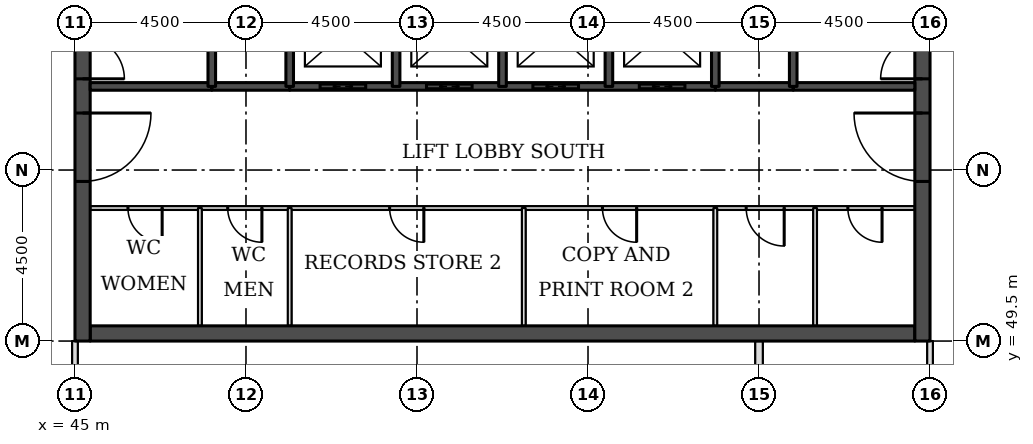
"""IFC4 building model, lengths in metres.
Left out: names, types, materials, properties, quantities, classifications, styles, units other than length and angle.
Written with IfcOpenShell. Run it as: python <this file> out.ifc"""

import sys

from ifc_helpers import new_model, si_unit, direction, frame, frame_2d, origin, place, context, subcontext, project, spatial, rectangle, extrude, element, fill, save


model = new_model("IFC4")
c1 = context("Model", 3, precision=1e-05, world=origin(), true_north=direction((0.0, 1.0)))
c2 = subcontext(c1, "Body", "Model", "MODEL_VIEW")
j1 = project(units=[si_unit("LENGTHUNIT", "METRE"), si_unit("PLANEANGLEUNIT", "RADIAN")], contexts=[c1])
p1 = place(None, origin())
s1 = spatial("IfcSite", under=j1, at=p1, CompositionType="ELEMENT")
p2 = place(p1, origin())
s2 = spatial("IfcBuilding", under=s1, at=p2, CompositionType="ELEMENT")
p3 = place(p2, frame((0.0, 0.0, 177.3)))
s3 = spatial("IfcBuildingStorey", under=s2, at=p3, CompositionType="ELEMENT", Elevation=177.3)
p4 = place(p3, frame((45.4, 49.7, 0.0), z_axis=(0.0, 0.0, 1.0), x_axis=(1.0, 0.0, 0.0)))
e1 = element("IfcWall", 1, at=p4, inside=s3, PredefinedType="SHEAR", context=c2, shape_type="SweptSolid", body=[
    extrude(rectangle(XDim=21.7, YDim=0.4, at=frame_2d((10.85, 0.0))), origin(), (0.0, 0.0, 1.0), 3.7),
])
p5 = place(p3, frame((45.2, 49.5, 0.0), z_axis=(0.0, 0.0, 1.0), x_axis=(0.0, 1.0, 0.0)))
e2 = element("IfcWall", 2, at=p5, inside=s3, PredefinedType="SHEAR", context=c2, shape_type="SweptSolid", body=[
    extrude(rectangle(XDim=22.5, YDim=0.4, at=frame_2d((11.25, 0.0))), origin(), (0.0, 0.0, 1.0), 3.7),
])
p6 = place(p5, frame((4.2, 0.0, 0.0)))
e3 = element("IfcOpeningElement", 3, at=p6, cuts=e2, PredefinedType="OPENING", context=c2, shape_type="SweptSolid", body=[
    extrude(rectangle(XDim=1.8, YDim=2.1, at=frame_2d((0.9, 1.05))), frame((0.0, 0.21, 0.0), z_axis=(0.0, -1.0, 0.0), x_axis=(1.0, 0.0, 0.0)), (0.0, 0.0, 1.0), 0.42),
])
p7 = place(p5, frame((6.9, 0.0, 0.0)))
e4 = element("IfcOpeningElement", 4, at=p7, cuts=e2, PredefinedType="OPENING", context=c2, shape_type="SweptSolid", body=[
    extrude(rectangle(XDim=1.1, YDim=2.1, at=frame_2d((0.55, 1.05))), frame((0.0, 0.21, 0.0), z_axis=(0.0, -1.0, 0.0), x_axis=(1.0, 0.0, 0.0)), (0.0, 0.0, 1.0), 0.42),
])
p8 = place(p5, frame((13.6, 0.0, 0.0)))
e5 = element("IfcOpeningElement", 5, at=p8, cuts=e2, PredefinedType="OPENING", context=c2, shape_type="SweptSolid", body=[
    extrude(rectangle(XDim=1.1, YDim=2.1, at=frame_2d((0.55, 1.05))), frame((0.0, 0.21, 0.0), z_axis=(0.0, -1.0, 0.0), x_axis=(1.0, 0.0, 0.0)), (0.0, 0.0, 1.0), 0.42),
])
p9 = place(p5, frame((16.5, 0.0, 0.0)))
e6 = element("IfcOpeningElement", 6, at=p9, cuts=e2, PredefinedType="OPENING", context=c2, shape_type="SweptSolid", body=[
    extrude(rectangle(XDim=1.8, YDim=2.1, at=frame_2d((0.9, 1.05))), frame((0.0, 0.21, 0.0), z_axis=(0.0, -1.0, 0.0), x_axis=(1.0, 0.0, 0.0)), (0.0, 0.0, 1.0), 0.42),
])
p10 = place(p3, frame((67.3, 49.5, 0.0), z_axis=(0.0, 0.0, 1.0), x_axis=(0.0, 1.0, 0.0)))
e7 = element("IfcWall", 7, at=p10, inside=s3, PredefinedType="SHEAR", context=c2, shape_type="SweptSolid", body=[
    extrude(rectangle(XDim=22.5, YDim=0.4, at=frame_2d((11.25, 0.0))), origin(), (0.0, 0.0, 1.0), 3.7),
])
p11 = place(p10, frame((4.2, 0.0, 0.0)))
e8 = element("IfcOpeningElement", 8, at=p11, cuts=e7, PredefinedType="OPENING", context=c2, shape_type="SweptSolid", body=[
    extrude(rectangle(XDim=1.8, YDim=2.1, at=frame_2d((0.9, 1.05))), frame((0.0, 0.21, 0.0), z_axis=(0.0, -1.0, 0.0), x_axis=(1.0, 0.0, 0.0)), (0.0, 0.0, 1.0), 0.42),
])
p12 = place(p10, frame((6.9, 0.0, 0.0)))
e9 = element("IfcOpeningElement", 9, at=p12, cuts=e7, PredefinedType="OPENING", context=c2, shape_type="SweptSolid", body=[
    extrude(rectangle(XDim=1.1, YDim=2.1, at=frame_2d((0.55, 1.05))), frame((0.0, 0.21, 0.0), z_axis=(0.0, -1.0, 0.0), x_axis=(1.0, 0.0, 0.0)), (0.0, 0.0, 1.0), 0.42),
])
p13 = place(p10, frame((13.6, 0.0, 0.0)))
e10 = element("IfcOpeningElement", 10, at=p13, cuts=e7, PredefinedType="OPENING", context=c2, shape_type="SweptSolid", body=[
    extrude(rectangle(XDim=1.1, YDim=2.1, at=frame_2d((0.55, 1.05))), frame((0.0, 0.21, 0.0), z_axis=(0.0, -1.0, 0.0), x_axis=(1.0, 0.0, 0.0)), (0.0, 0.0, 1.0), 0.42),
])
p14 = place(p10, frame((16.5, 0.0, 0.0)))
e11 = element("IfcOpeningElement", 11, at=p14, cuts=e7, PredefinedType="OPENING", context=c2, shape_type="SweptSolid", body=[
    extrude(rectangle(XDim=1.8, YDim=2.1, at=frame_2d((0.9, 1.05))), frame((0.0, 0.21, 0.0), z_axis=(0.0, -1.0, 0.0), x_axis=(1.0, 0.0, 0.0)), (0.0, 0.0, 1.0), 0.42),
])
p15 = place(p3, frame((67.5, 43.5, 0.0), z_axis=(0.0, 0.0, 1.0), x_axis=(0.0, 1.0, 0.0)))
e12 = element("IfcWall", 12, at=p15, inside=s3, PredefinedType="PARTITIONING", context=c2, shape_type="SweptSolid", body=[
    extrude(rectangle(XDim=6.0, YDim=0.15, at=frame_2d((3.0, 0.0))), origin(), (0.0, 0.0, 1.0), 3.022),
])
p16 = place(p15, frame((2.5, 0.0, 0.0)))
e13 = element("IfcOpeningElement", 13, at=p16, cuts=e12, PredefinedType="OPENING", context=c2, shape_type="SweptSolid", body=[
    extrude(rectangle(XDim=1.0, YDim=2.1, at=frame_2d((0.5, 1.05))), frame((0.0, 0.085, 0.0), z_axis=(0.0, -1.0, 0.0), x_axis=(1.0, 0.0, 0.0)), (0.0, 0.0, 1.0), 0.17),
])
p17 = place(p3, frame((45.0, 46.5, 0.0), z_axis=(0.0, 0.0, 1.0), x_axis=(0.0, 1.0, 0.0)))
e14 = element("IfcWall", 14, at=p17, inside=s3, PredefinedType="PARTITIONING", context=c2, shape_type="SweptSolid", body=[
    extrude(rectangle(XDim=3.0, YDim=0.15, at=frame_2d((1.5, 0.0))), origin(), (0.0, 0.0, 1.0), 3.022),
])
p18 = place(p17, frame((1.0, 0.0, 0.0)))
e15 = element("IfcOpeningElement", 15, at=p18, cuts=e14, PredefinedType="OPENING", context=c2, shape_type="SweptSolid", body=[
    extrude(rectangle(XDim=1.0, YDim=2.1, at=frame_2d((0.5, 1.05))), frame((0.0, 0.085, 0.0), z_axis=(0.0, -1.0, 0.0), x_axis=(1.0, 0.0, 0.0)), (0.0, 0.0, 1.0), 0.17),
])
p19 = place(p3, frame((63.0, 46.5, 0.0), z_axis=(0.0, 0.0, 1.0), x_axis=(0.0, 1.0, 0.0)))
e16 = element("IfcWall", 16, at=p19, inside=s3, PredefinedType="PARTITIONING", context=c2, shape_type="SweptSolid", body=[
    extrude(rectangle(XDim=3.0, YDim=0.2, at=frame_2d((1.5, 0.0))), origin(), (0.0, 0.0, 1.0), 3.55),
])
p20 = place(p3, frame((45.4, 53.0, 0.0), z_axis=(0.0, 0.0, 1.0), x_axis=(1.0, 0.0, 0.0)))
e17 = element("IfcWall", 17, at=p20, inside=s3, PredefinedType="PARTITIONING", context=c2, shape_type="SweptSolid", body=[
    extrude(rectangle(XDim=21.7, YDim=0.1, at=frame_2d((10.85, 0.0))), origin(), (0.0, 0.0, 1.0), 3.55),
])
p21 = place(p20, frame((19.938, 0.0, 0.0)))
e18 = element("IfcOpeningElement", 18, at=p21, cuts=e17, PredefinedType="OPENING", context=c2, shape_type="SweptSolid", body=[
    extrude(rectangle(XDim=0.9, YDim=2.1, at=frame_2d((0.45, 1.05))), frame((0.0, 0.06, 0.0), z_axis=(0.0, -1.0, 0.0), x_axis=(1.0, 0.0, 0.0)), (0.0, 0.0, 1.0), 0.12),
])
p22 = place(p20, frame((17.262, 0.0, 0.0)))
e19 = element("IfcOpeningElement", 19, at=p22, cuts=e17, PredefinedType="OPENING", context=c2, shape_type="SweptSolid", body=[
    extrude(rectangle(XDim=1.0, YDim=2.1, at=frame_2d((0.5, 1.05))), frame((0.0, 0.06, 0.0), z_axis=(0.0, -1.0, 0.0), x_axis=(1.0, 0.0, 0.0)), (0.0, 0.0, 1.0), 0.12),
])
p23 = place(p20, frame((0.994, 0.0, 0.0)))
e20 = element("IfcOpeningElement", 20, at=p23, cuts=e17, PredefinedType="OPENING", context=c2, shape_type="SweptSolid", body=[
    extrude(rectangle(XDim=0.9, YDim=2.1, at=frame_2d((0.45, 1.05))), frame((0.0, 0.06, 0.0), z_axis=(0.0, -1.0, 0.0), x_axis=(1.0, 0.0, 0.0)), (0.0, 0.0, 1.0), 0.12),
])
p24 = place(p20, frame((3.619, 0.0, 0.0)))
e21 = element("IfcOpeningElement", 21, at=p24, cuts=e17, PredefinedType="OPENING", context=c2, shape_type="SweptSolid", body=[
    extrude(rectangle(XDim=0.9, YDim=2.1, at=frame_2d((0.45, 1.05))), frame((0.0, 0.06, 0.0), z_axis=(0.0, -1.0, 0.0), x_axis=(1.0, 0.0, 0.0)), (0.0, 0.0, 1.0), 0.12),
])
p25 = place(p20, frame((7.88, 0.0, 0.0)))
e22 = element("IfcOpeningElement", 22, at=p25, cuts=e17, PredefinedType="OPENING", context=c2, shape_type="SweptSolid", body=[
    extrude(rectangle(XDim=0.9, YDim=2.1, at=frame_2d((0.45, 1.05))), frame((0.0, 0.06, 0.0), z_axis=(0.0, -1.0, 0.0), x_axis=(1.0, 0.0, 0.0)), (0.0, 0.0, 1.0), 0.12),
])
p26 = place(p20, frame((13.48, 0.0, 0.0)))
e23 = element("IfcOpeningElement", 23, at=p26, cuts=e17, PredefinedType="OPENING", context=c2, shape_type="SweptSolid", body=[
    extrude(rectangle(XDim=0.9, YDim=2.1, at=frame_2d((0.45, 1.05))), frame((0.0, 0.06, 0.0), z_axis=(0.0, -1.0, 0.0), x_axis=(1.0, 0.0, 0.0)), (0.0, 0.0, 1.0), 0.12),
])
for number, where, z_axis, x_axis in (
    (24, (48.6, 56.2, 0.0), (0.0, 0.0, 1.0), (1.0, 0.0, 0.0)),
    (25, (61.85, 56.2, 0.0), (0.0, 0.0, 1.0), (1.0, 0.0, 0.0)),
):
    element("IfcWall", number, at=place(p3, frame(where, z_axis=z_axis, x_axis=x_axis)), inside=s3, PredefinedType="SOLIDWALL", context=c2, shape_type="SweptSolid", body=[
        extrude(rectangle(XDim=2.05, YDim=0.2, at=frame_2d((1.025, 0.0))), origin(), (0.0, 0.0, 1.0), 3.55),
    ])
p27 = place(p3, frame((45.4, 56.2, 0.0), z_axis=(0.0, 0.0, 1.0), x_axis=(1.0, 0.0, 0.0)))
e26 = element("IfcWall", 26, at=p27, inside=s3, PredefinedType="SOLIDWALL", context=c2, shape_type="SweptSolid", body=[
    extrude(rectangle(XDim=3.2, YDim=0.2, at=frame_2d((1.6, 0.0))), origin(), (0.0, 0.0, 1.0), 3.55),
])
p28 = place(p3, frame((50.65, 56.2, 0.0), z_axis=(0.0, 0.0, 1.0), x_axis=(1.0, 0.0, 0.0)))
e27 = element("IfcWall", 27, at=p28, inside=s3, PredefinedType="SOLIDWALL", context=c2, shape_type="SweptSolid", body=[
    extrude(rectangle(XDim=11.2, YDim=0.2, at=frame_2d((5.6, 0.0))), origin(), (0.0, 0.0, 1.0), 3.55),
])
p29 = place(p28, frame((0.8, 0.0, 0.0)))
e28 = element("IfcOpeningElement", 28, at=p29, cuts=e27, PredefinedType="OPENING", context=c2, shape_type="SweptSolid", body=[
    extrude(rectangle(XDim=1.2, YDim=2.1, at=frame_2d((0.6, 1.05))), frame((0.0, 0.11, 0.0), z_axis=(0.0, -1.0, 0.0), x_axis=(1.0, 0.0, 0.0)), (0.0, 0.0, 1.0), 0.22),
])
p30 = place(p28, frame((3.6, 0.0, 0.0)))
e29 = element("IfcOpeningElement", 29, at=p30, cuts=e27, PredefinedType="OPENING", context=c2, shape_type="SweptSolid", body=[
    extrude(rectangle(XDim=1.2, YDim=2.1, at=frame_2d((0.6, 1.05))), frame((0.0, 0.11, 0.0), z_axis=(0.0, -1.0, 0.0), x_axis=(1.0, 0.0, 0.0)), (0.0, 0.0, 1.0), 0.22),
])
p31 = place(p28, frame((6.4, 0.0, 0.0)))
e30 = element("IfcOpeningElement", 30, at=p31, cuts=e27, PredefinedType="OPENING", context=c2, shape_type="SweptSolid", body=[
    extrude(rectangle(XDim=1.2, YDim=2.1, at=frame_2d((0.6, 1.05))), frame((0.0, 0.11, 0.0), z_axis=(0.0, -1.0, 0.0), x_axis=(1.0, 0.0, 0.0)), (0.0, 0.0, 1.0), 0.22),
])
p32 = place(p28, frame((9.2, 0.0, 0.0)))
e31 = element("IfcOpeningElement", 31, at=p32, cuts=e27, PredefinedType="OPENING", context=c2, shape_type="SweptSolid", body=[
    extrude(rectangle(XDim=1.2, YDim=2.1, at=frame_2d((0.6, 1.05))), frame((0.0, 0.11, 0.0), z_axis=(0.0, -1.0, 0.0), x_axis=(1.0, 0.0, 0.0)), (0.0, 0.0, 1.0), 0.22),
])
p33 = place(p3, frame((63.9, 56.2, 0.0), z_axis=(0.0, 0.0, 1.0), x_axis=(1.0, 0.0, 0.0)))
e32 = element("IfcWall", 32, at=p33, inside=s3, PredefinedType="SOLIDWALL", context=c2, shape_type="SweptSolid", body=[
    extrude(rectangle(XDim=3.2, YDim=0.2, at=frame_2d((1.6, 0.0))), origin(), (0.0, 0.0, 1.0), 3.55),
])
p34 = place(p3, frame((48.288, 49.9, 0.0), z_axis=(0.0, 0.0, 1.0), x_axis=(0.0, 1.0, 0.0)))
e33 = element("IfcWall", 33, at=p34, inside=s3, PredefinedType="PARTITIONING", context=c2, shape_type="SweptSolid", body=[
    extrude(rectangle(XDim=3.1, YDim=0.1, at=frame_2d((1.55, 0.0))), origin(), (0.0, 0.0, 1.0), 3.55),
])
p35 = place(p3, frame((48.6, 56.2, 0.0), z_axis=(0.0, 0.0, 1.0), x_axis=(0.0, 1.0, 0.0)))
e34 = element("IfcWall", 34, at=p35, inside=s3, PredefinedType="SOLIDWALL", context=c2, shape_type="SweptSolid", body=[
    extrude(rectangle(XDim=5.8, YDim=0.2, at=frame_2d((2.9, 0.0))), origin(), (0.0, 0.0, 1.0), 3.55),
])
p36 = place(p3, frame((50.65, 49.9, 0.0), z_axis=(0.0, 0.0, 1.0), x_axis=(0.0, 1.0, 0.0)))
e35 = element("IfcWall", 35, at=p36, inside=s3, PredefinedType="PARTITIONING", context=c2, shape_type="SweptSolid", body=[
    extrude(rectangle(XDim=3.1, YDim=0.1, at=frame_2d((1.55, 0.0))), origin(), (0.0, 0.0, 1.0), 3.55),
])
for number, where, z_axis, x_axis in (
    (36, (50.65, 56.2, 0.0), (0.0, 0.0, 1.0), (0.0, 1.0, 0.0)),
    (37, (53.45, 56.2, 0.0), (0.0, 0.0, 1.0), (0.0, 1.0, 0.0)),
    (38, (56.25, 56.2, 0.0), (0.0, 0.0, 1.0), (0.0, 1.0, 0.0)),
):
    element("IfcWall", number, at=place(p3, frame(where, z_axis=z_axis, x_axis=x_axis)), inside=s3, PredefinedType="SOLIDWALL", context=c2, shape_type="SweptSolid", body=[
        extrude(rectangle(XDim=2.8, YDim=0.2, at=frame_2d((1.4, 0.0))), origin(), (0.0, 0.0, 1.0), 3.55),
    ])
p37 = place(p3, frame((56.81, 49.9, 0.0), z_axis=(0.0, 0.0, 1.0), x_axis=(0.0, 1.0, 0.0)))
e39 = element("IfcWall", 39, at=p37, inside=s3, PredefinedType="PARTITIONING", context=c2, shape_type="SweptSolid", body=[
    extrude(rectangle(XDim=3.1, YDim=0.1, at=frame_2d((1.55, 0.0))), origin(), (0.0, 0.0, 1.0), 3.55),
])
p38 = place(p3, frame((59.05, 56.2, 0.0), z_axis=(0.0, 0.0, 1.0), x_axis=(0.0, 1.0, 0.0)))
e40 = element("IfcWall", 40, at=p38, inside=s3, PredefinedType="SOLIDWALL", context=c2, shape_type="SweptSolid", body=[
    extrude(rectangle(XDim=2.8, YDim=0.2, at=frame_2d((1.4, 0.0))), origin(), (0.0, 0.0, 1.0), 3.55),
])
p39 = place(p3, frame((61.85, 49.9, 0.0), z_axis=(0.0, 0.0, 1.0), x_axis=(0.0, 1.0, 0.0)))
e41 = element("IfcWall", 41, at=p39, inside=s3, PredefinedType="PARTITIONING", context=c2, shape_type="SweptSolid", body=[
    extrude(rectangle(XDim=3.1, YDim=0.1, at=frame_2d((1.55, 0.0))), origin(), (0.0, 0.0, 1.0), 3.55),
])
p40 = place(p3, frame((61.85, 56.2, 0.0), z_axis=(0.0, 0.0, 1.0), x_axis=(0.0, 1.0, 0.0)))
e42 = element("IfcWall", 42, at=p40, inside=s3, PredefinedType="SOLIDWALL", context=c2, shape_type="SweptSolid", body=[
    extrude(rectangle(XDim=2.8, YDim=0.2, at=frame_2d((1.4, 0.0))), origin(), (0.0, 0.0, 1.0), 3.55),
])
p41 = place(p3, frame((63.9, 56.2, 0.0), z_axis=(0.0, 0.0, 1.0), x_axis=(0.0, 1.0, 0.0)))
e43 = element("IfcWall", 43, at=p41, inside=s3, PredefinedType="SOLIDWALL", context=c2, shape_type="SweptSolid", body=[
    extrude(rectangle(XDim=5.8, YDim=0.2, at=frame_2d((2.9, 0.0))), origin(), (0.0, 0.0, 1.0), 3.55),
])
p42 = place(p3, frame((64.475, 49.9, 0.0), z_axis=(0.0, 0.0, 1.0), x_axis=(0.0, 1.0, 0.0)))
e44 = element("IfcWall", 44, at=p42, inside=s3, PredefinedType="PARTITIONING", context=c2, shape_type="SweptSolid", body=[
    extrude(rectangle(XDim=3.1, YDim=0.1, at=frame_2d((1.55, 0.0))), origin(), (0.0, 0.0, 1.0), 3.55),
])
p43 = place(p29, origin())
e45 = element("IfcDoor", 45, at=p43, inside=s3, OperationType="DOUBLE_DOOR_SLIDING", PredefinedType="DOOR", context=c2, shape_type="SweptSolid", body=[
    extrude(rectangle(XDim=1.2, YDim=2.1, at=frame_2d((0.6, 1.05))), frame((0.0, 0.025, 0.0), z_axis=(0.0, -1.0, 0.0), x_axis=(1.0, 0.0, 0.0)), (0.0, 0.0, 1.0), 0.05),
])
fill(e28, e45)
p44 = place(p30, origin())
e46 = element("IfcDoor", 46, at=p44, inside=s3, OperationType="DOUBLE_DOOR_SLIDING", PredefinedType="DOOR", context=c2, shape_type="SweptSolid", body=[
    extrude(rectangle(XDim=1.2, YDim=2.1, at=frame_2d((0.6, 1.05))), frame((0.0, 0.025, 0.0), z_axis=(0.0, -1.0, 0.0), x_axis=(1.0, 0.0, 0.0)), (0.0, 0.0, 1.0), 0.05),
])
fill(e29, e46)
p45 = place(p31, origin())
e47 = element("IfcDoor", 47, at=p45, inside=s3, OperationType="DOUBLE_DOOR_SLIDING", PredefinedType="DOOR", context=c2, shape_type="SweptSolid", body=[
    extrude(rectangle(XDim=1.2, YDim=2.1, at=frame_2d((0.6, 1.05))), frame((0.0, 0.025, 0.0), z_axis=(0.0, -1.0, 0.0), x_axis=(1.0, 0.0, 0.0)), (0.0, 0.0, 1.0), 0.05),
])
fill(e30, e47)
p46 = place(p32, origin())
e48 = element("IfcDoor", 48, at=p46, inside=s3, OperationType="DOUBLE_DOOR_SLIDING", PredefinedType="DOOR", context=c2, shape_type="SweptSolid", body=[
    extrude(rectangle(XDim=1.2, YDim=2.1, at=frame_2d((0.6, 1.05))), frame((0.0, 0.025, 0.0), z_axis=(0.0, -1.0, 0.0), x_axis=(1.0, 0.0, 0.0)), (0.0, 0.0, 1.0), 0.05),
])
fill(e31, e48)
p47 = place(p6, frame((1.8, 0.0, 0.0), z_axis=(0.0, 0.0, 1.0), x_axis=(-1.0, 0.0, 0.0)))
e49 = element("IfcDoor", 49, at=p47, inside=s3, OperationType="SINGLE_SWING_LEFT", PredefinedType="DOOR", context=c2, shape_type="SweptSolid", body=[
    extrude(rectangle(XDim=1.8, YDim=2.1, at=frame_2d((0.9, 1.05))), frame((0.0, 0.025, 0.0), z_axis=(0.0, -1.0, 0.0), x_axis=(1.0, 0.0, 0.0)), (0.0, 0.0, 1.0), 0.05),
])
fill(e3, e49)
p48 = place(p7, frame((1.1, 0.0, 0.0), z_axis=(0.0, 0.0, 1.0), x_axis=(-1.0, 0.0, 0.0)))
e50 = element("IfcDoor", 50, at=p48, inside=s3, OperationType="SINGLE_SWING_RIGHT", PredefinedType="DOOR", context=c2, shape_type="SweptSolid", body=[
    extrude(rectangle(XDim=1.1, YDim=2.1, at=frame_2d((0.55, 1.05))), frame((0.0, 0.025, 0.0), z_axis=(0.0, -1.0, 0.0), x_axis=(1.0, 0.0, 0.0)), (0.0, 0.0, 1.0), 0.05),
])
fill(e4, e50)
p49 = place(p11, origin())
e51 = element("IfcDoor", 51, at=p49, inside=s3, OperationType="SINGLE_SWING_RIGHT", PredefinedType="DOOR", context=c2, shape_type="SweptSolid", body=[
    extrude(rectangle(XDim=1.8, YDim=2.1, at=frame_2d((0.9, 1.05))), frame((0.0, 0.025, 0.0), z_axis=(0.0, -1.0, 0.0), x_axis=(1.0, 0.0, 0.0)), (0.0, 0.0, 1.0), 0.05),
])
fill(e8, e51)
p50 = place(p12, origin())
e52 = element("IfcDoor", 52, at=p50, inside=s3, OperationType="SINGLE_SWING_LEFT", PredefinedType="DOOR", context=c2, shape_type="SweptSolid", body=[
    extrude(rectangle(XDim=1.1, YDim=2.1, at=frame_2d((0.55, 1.05))), frame((0.0, 0.025, 0.0), z_axis=(0.0, -1.0, 0.0), x_axis=(1.0, 0.0, 0.0)), (0.0, 0.0, 1.0), 0.05),
])
fill(e9, e52)
p51 = place(p21, frame((0.9, 0.0, 0.0), z_axis=(0.0, 0.0, 1.0), x_axis=(-1.0, 0.0, 0.0)))
e53 = element("IfcDoor", 53, at=p51, inside=s3, OperationType="SINGLE_SWING_LEFT", PredefinedType="DOOR", context=c2, shape_type="SweptSolid", body=[
    extrude(rectangle(XDim=0.9, YDim=2.1, at=frame_2d((0.45, 1.05))), frame((0.0, 0.025, 0.0), z_axis=(0.0, -1.0, 0.0), x_axis=(1.0, 0.0, 0.0)), (0.0, 0.0, 1.0), 0.05),
])
fill(e18, e53)
p52 = place(p22, frame((1.0, 0.0, 0.0), z_axis=(0.0, 0.0, 1.0), x_axis=(-1.0, 0.0, 0.0)))
e54 = element("IfcDoor", 54, at=p52, inside=s3, OperationType="SINGLE_SWING_LEFT", PredefinedType="DOOR", context=c2, shape_type="SweptSolid", body=[
    extrude(rectangle(XDim=1.0, YDim=2.1, at=frame_2d((0.5, 1.05))), frame((0.0, 0.025, 0.0), z_axis=(0.0, -1.0, 0.0), x_axis=(1.0, 0.0, 0.0)), (0.0, 0.0, 1.0), 0.05),
])
fill(e19, e54)
p53 = place(p23, frame((0.9, 0.0, 0.0), z_axis=(0.0, 0.0, 1.0), x_axis=(-1.0, 0.0, 0.0)))
e55 = element("IfcDoor", 55, at=p53, inside=s3, OperationType="SINGLE_SWING_LEFT", PredefinedType="DOOR", context=c2, shape_type="SweptSolid", body=[
    extrude(rectangle(XDim=0.9, YDim=2.1, at=frame_2d((0.45, 1.05))), frame((0.0, 0.025, 0.0), z_axis=(0.0, -1.0, 0.0), x_axis=(1.0, 0.0, 0.0)), (0.0, 0.0, 1.0), 0.05),
])
fill(e20, e55)
p54 = place(p24, frame((0.9, 0.0, 0.0), z_axis=(0.0, 0.0, 1.0), x_axis=(-1.0, 0.0, 0.0)))
e56 = element("IfcDoor", 56, at=p54, inside=s3, OperationType="SINGLE_SWING_LEFT", PredefinedType="DOOR", context=c2, shape_type="SweptSolid", body=[
    extrude(rectangle(XDim=0.9, YDim=2.1, at=frame_2d((0.45, 1.05))), frame((0.0, 0.025, 0.0), z_axis=(0.0, -1.0, 0.0), x_axis=(1.0, 0.0, 0.0)), (0.0, 0.0, 1.0), 0.05),
])
fill(e21, e56)
p55 = place(p25, frame((0.9, 0.0, 0.0), z_axis=(0.0, 0.0, 1.0), x_axis=(-1.0, 0.0, 0.0)))
e57 = element("IfcDoor", 57, at=p55, inside=s3, OperationType="SINGLE_SWING_LEFT", PredefinedType="DOOR", context=c2, shape_type="SweptSolid", body=[
    extrude(rectangle(XDim=0.9, YDim=2.1, at=frame_2d((0.45, 1.05))), frame((0.0, 0.025, 0.0), z_axis=(0.0, -1.0, 0.0), x_axis=(1.0, 0.0, 0.0)), (0.0, 0.0, 1.0), 0.05),
])
fill(e22, e57)
p56 = place(p26, frame((0.9, 0.0, 0.0), z_axis=(0.0, 0.0, 1.0), x_axis=(-1.0, 0.0, 0.0)))
e58 = element("IfcDoor", 58, at=p56, inside=s3, OperationType="SINGLE_SWING_LEFT", PredefinedType="DOOR", context=c2, shape_type="SweptSolid", body=[
    extrude(rectangle(XDim=0.9, YDim=2.1, at=frame_2d((0.45, 1.05))), frame((0.0, 0.025, 0.0), z_axis=(0.0, -1.0, 0.0), x_axis=(1.0, 0.0, 0.0)), (0.0, 0.0, 1.0), 0.05),
])
fill(e23, e58)
save(model, sys.argv[1])
